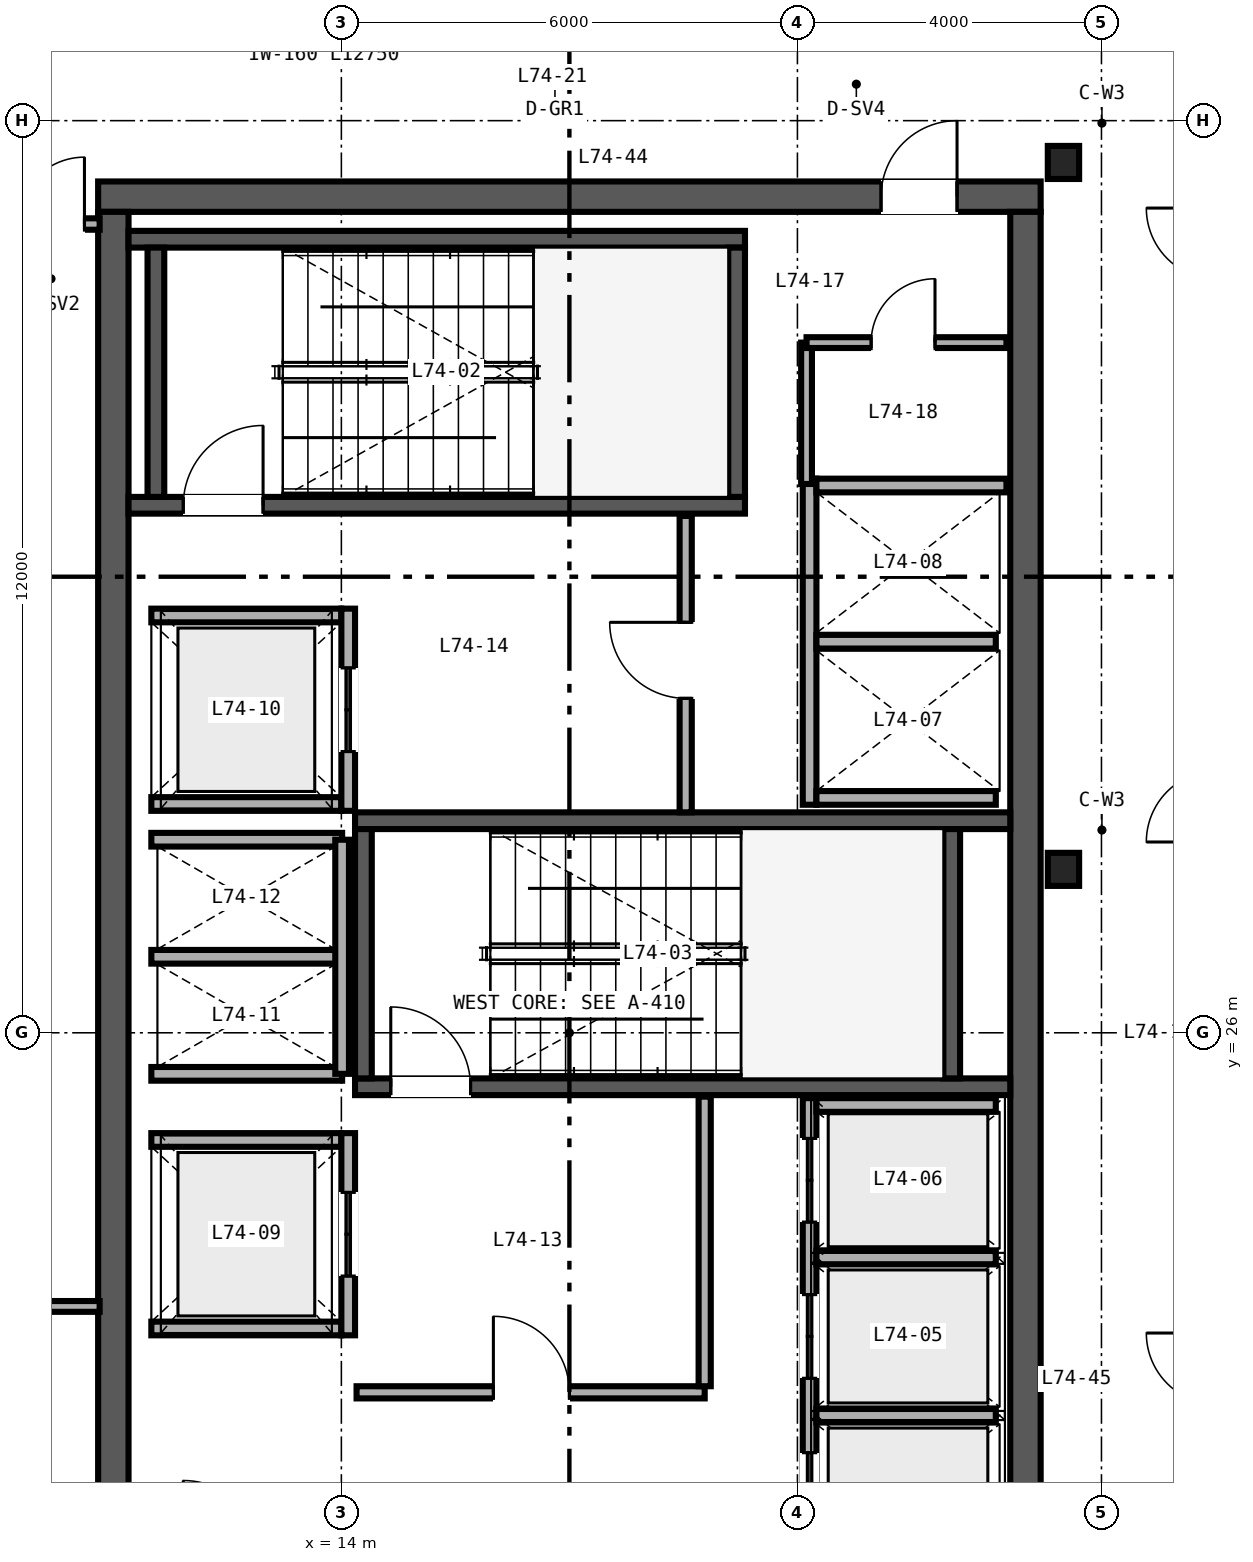
"""IFC4 building model, lengths in metres.
Left out: names, types, materials, properties, quantities, classifications, styles, units other than length and angle.
Written with IfcOpenShell. Run it as: python <this file> out.ifc"""

import sys

from ifc_helpers import new_model, si_unit, direction, frame, frame_2d, origin, origin_2d, place, context, subcontext, project, spatial, rectangle, i_section, extrude, source, transform, mapped, element, fill, save


model = new_model("IFC4")
c1 = context("Model", 3, precision=1e-05, world=origin(), true_north=direction((0.0, 1.0)))
c2 = subcontext(c1, "Body", "Model", "MODEL_VIEW")
j1 = project(units=[si_unit("LENGTHUNIT", "METRE"), si_unit("PLANEANGLEUNIT", "RADIAN")], contexts=[c1])
p1 = place(None, origin())
s1 = spatial("IfcSite", under=j1, at=p1, CompositionType="ELEMENT")
p2 = place(p1, origin())
s2 = spatial("IfcBuilding", under=s1, at=p2, CompositionType="ELEMENT")
p3 = place(p2, frame((0.0, 0.0, 290.4)))
s3 = spatial("IfcBuildingStorey", under=s2, at=p3, CompositionType="ELEMENT", Elevation=290.4)
p4 = place(p3, frame((10.8, 37.0, 0.0), z_axis=(0.0, 0.0, 1.0), x_axis=(1.0, 0.0, 0.0)))
e1 = element("IfcWall", 1, at=p4, inside=s3, PredefinedType="SHEAR", context=c2, shape_type="SweptSolid", body=[
    extrude(rectangle(XDim=12.4, YDim=0.4, at=frame_2d((6.2, 0.0))), origin(), (0.0, 0.0, 1.0), 3.38),
])
p5 = place(p4, frame((10.3, 0.0, 0.0)))
e2 = element("IfcOpeningElement", 2, at=p5, cuts=e1, PredefinedType="OPENING", context=c2, shape_type="SweptSolid", body=[
    extrude(rectangle(XDim=1.0, YDim=2.15, at=frame_2d((0.5, 1.075))), frame((0.0, 0.21, 0.0), z_axis=(0.0, -1.0, 0.0), x_axis=(1.0, 0.0, 0.0)), (0.0, 0.0, 1.0), 0.42),
])
for number, where, z_axis, x_axis in (
    (3, (11.0, 15.2, 0.0), (0.0, 0.0, 1.0), (0.0, 1.0, 0.0)),
    (4, (23.0, 15.2, 0.0), (0.0, 0.0, 1.0), (0.0, 1.0, 0.0)),
):
    element("IfcWall", number, at=place(p3, frame(where, z_axis=z_axis, x_axis=x_axis)), inside=s3, PredefinedType="SHEAR", context=c2, shape_type="SweptSolid", body=[
        extrude(rectangle(XDim=21.6, YDim=0.4, at=frame_2d((10.8, 0.0))), origin(), (0.0, 0.0, 1.0), 3.38),
    ])
p6 = place(p3, frame((11.2, 32.94, 0.0), z_axis=(0.0, 0.0, 1.0), x_axis=(1.0, 0.0, 0.0)))
e5 = element("IfcWall", 5, at=p6, inside=s3, PredefinedType="SHEAR", context=c2, shape_type="SweptSolid", body=[
    extrude(rectangle(XDim=8.11, YDim=0.22, at=frame_2d((4.055, 0.0))), origin(), (0.0, 0.0, 1.0), 3.4),
])
p7 = place(p6, frame((0.72, 0.0, 0.0)))
e6 = element("IfcOpeningElement", 6, at=p7, cuts=e5, PredefinedType="OPENING", context=c2, shape_type="SweptSolid", body=[
    extrude(rectangle(XDim=1.05, YDim=2.15, at=frame_2d((0.525, 1.075))), frame((0.0, 0.12, 0.0), z_axis=(0.0, -1.0, 0.0), x_axis=(1.0, 0.0, 0.0)), (0.0, 0.0, 1.0), 0.24),
])
p8 = place(p3, frame((11.2, 36.44, 0.0), z_axis=(0.0, 0.0, 1.0), x_axis=(1.0, 0.0, 0.0)))
e7 = element("IfcWall", 7, at=p8, inside=s3, PredefinedType="SHEAR", context=c2, shape_type="SweptSolid", body=[
    extrude(rectangle(XDim=8.11, YDim=0.22, at=frame_2d((4.055, 0.0))), origin(), (0.0, 0.0, 1.0), 3.4),
])
for number, where, z_axis, x_axis in (
    (8, (11.56, 33.05, 0.0), (0.0, 0.0, 1.0), (0.0, 1.0, 0.0)),
    (9, (19.2, 33.05, 0.0), (0.0, 0.0, 1.0), (0.0, 1.0, 0.0)),
):
    element("IfcWall", number, at=place(p3, frame(where, z_axis=z_axis, x_axis=x_axis)), inside=s3, PredefinedType="SHEAR", context=c2, shape_type="SweptSolid", body=[
        extrude(rectangle(XDim=3.28, YDim=0.22, at=frame_2d((1.64, 0.0))), origin(), (0.0, 0.0, 1.0), 3.4),
    ])
p9 = place(p3, frame((14.18, 25.29, 0.0), z_axis=(0.0, 0.0, 1.0), x_axis=(1.0, 0.0, 0.0)))
e10 = element("IfcWall", 10, at=p9, inside=s3, PredefinedType="SHEAR", context=c2, shape_type="SweptSolid", body=[
    extrude(rectangle(XDim=8.62, YDim=0.22, at=frame_2d((4.31, 0.0))), origin(), (0.0, 0.0, 1.0), 3.4),
])
p10 = place(p9, frame((0.47, 0.0, 0.0)))
e11 = element("IfcOpeningElement", 11, at=p10, cuts=e10, PredefinedType="OPENING", context=c2, shape_type="SweptSolid", body=[
    extrude(rectangle(XDim=1.05, YDim=2.15, at=frame_2d((0.525, 1.075))), frame((0.0, 0.12, 0.0), z_axis=(0.0, -1.0, 0.0), x_axis=(1.0, 0.0, 0.0)), (0.0, 0.0, 1.0), 0.24),
])
p11 = place(p3, frame((14.18, 28.79, 0.0), z_axis=(0.0, 0.0, 1.0), x_axis=(1.0, 0.0, 0.0)))
e12 = element("IfcWall", 12, at=p11, inside=s3, PredefinedType="SHEAR", context=c2, shape_type="SweptSolid", body=[
    extrude(rectangle(XDim=8.62, YDim=0.22, at=frame_2d((4.31, 0.0))), origin(), (0.0, 0.0, 1.0), 3.4),
])
for number, where, z_axis, x_axis in (
    (13, (14.29, 25.4, 0.0), (0.0, 0.0, 1.0), (0.0, 1.0, 0.0)),
    (14, (22.03, 25.4, 0.0), (0.0, 0.0, 1.0), (0.0, 1.0, 0.0)),
):
    element("IfcWall", number, at=place(p3, frame(where, z_axis=z_axis, x_axis=x_axis)), inside=s3, PredefinedType="SHEAR", context=c2, shape_type="SweptSolid", body=[
        extrude(rectangle(XDim=3.28, YDim=0.22, at=frame_2d((1.64, 0.0))), origin(), (0.0, 0.0, 1.0), 3.4),
    ])
m1 = source(origin(), c2, "Body", "SweptSolid", [
    extrude(i_section(OverallWidth=0.412, OverallDepth=0.435, WebThickness=0.036, FlangeThickness=0.057, FilletRadius=0.025, at=origin_2d()), origin(), (0.0, 0.0, 1.0), 3.38),
])
for number, where, z_axis, x_axis in (
    (15, (23.5, 28.15, 0.0), (0.0, 0.0, 1.0), (1.0, 0.0, 0.0)),
    (16, (23.5, 37.45, 0.0), (0.0, 0.0, 1.0), (1.0, 0.0, 0.0)),
):
    element("IfcColumn", number, at=place(p3, frame(where, z_axis=z_axis, x_axis=x_axis)), inside=s3, PredefinedType="COLUMN", context=c2, shape_type="MappedRepresentation", body=[
        mapped(m1, transform((0.0, 0.0, 0.0), scale=1.0)),
    ])
p12 = place(p3, frame((20.16, 18.82, 0.0), z_axis=(0.0, 0.0, 1.0), x_axis=(0.0, 1.0, 0.0)))
e17 = element("IfcWall", 17, at=p12, inside=s3, PredefinedType="SOLIDWALL", context=c2, shape_type="SweptSolid", body=[
    extrude(rectangle(XDim=6.32, YDim=0.18, at=frame_2d((3.16, 0.0))), origin(), (0.0, 0.0, 1.0), 2.48),
])
p13 = place(p12, frame((0.555, 0.0, 0.0)))
e18 = element("IfcOpeningElement", 18, at=p13, cuts=e17, PredefinedType="OPENING", context=c2, shape_type="SweptSolid", body=[
    extrude(rectangle(XDim=1.1, YDim=2.2, at=frame_2d((0.55, 1.1))), frame((0.0, 0.1, 0.0), z_axis=(0.0, -1.0, 0.0), x_axis=(1.0, 0.0, 0.0)), (0.0, 0.0, 1.0), 0.2),
])
p14 = place(p12, frame((2.635, 0.0, 0.0)))
e19 = element("IfcOpeningElement", 19, at=p14, cuts=e17, PredefinedType="OPENING", context=c2, shape_type="SweptSolid", body=[
    extrude(rectangle(XDim=1.1, YDim=2.2, at=frame_2d((0.55, 1.1))), frame((0.0, 0.1, 0.0), z_axis=(0.0, -1.0, 0.0), x_axis=(1.0, 0.0, 0.0)), (0.0, 0.0, 1.0), 0.2),
])
p15 = place(p12, frame((4.69, 0.0, 0.0)))
e20 = element("IfcOpeningElement", 20, at=p15, cuts=e17, PredefinedType="OPENING", context=c2, shape_type="SweptSolid", body=[
    extrude(rectangle(XDim=1.1, YDim=2.2, at=frame_2d((0.55, 1.1))), frame((0.0, 0.1, 0.0), z_axis=(0.0, -1.0, 0.0), x_axis=(1.0, 0.0, 0.0)), (0.0, 0.0, 1.0), 0.2),
])
p16 = place(p3, frame((20.25, 25.05, 0.0), z_axis=(0.0, 0.0, 1.0), x_axis=(1.0, 0.0, 0.0)))
e21 = element("IfcWall", 21, at=p16, inside=s3, PredefinedType="SOLIDWALL", context=c2, shape_type="SweptSolid", body=[
    extrude(rectangle(XDim=2.36, YDim=0.18, at=frame_2d((1.18, 0.0))), origin(), (0.0, 0.0, 1.0), 3.38),
])
p17 = place(p3, frame((20.25, 20.965, 0.0), z_axis=(0.0, 0.0, 1.0), x_axis=(1.0, 0.0, 0.0)))
e22 = element("IfcWall", 22, at=p17, inside=s3, PredefinedType="SOLIDWALL", context=c2, shape_type="SweptSolid", body=[
    extrude(rectangle(XDim=2.36, YDim=0.18, at=frame_2d((1.18, 0.0))), origin(), (0.0, 0.0, 1.0), 2.48),
])
p18 = place(p3, frame((20.25, 23.045, 0.0), z_axis=(0.0, 0.0, 1.0), x_axis=(1.0, 0.0, 0.0)))
e23 = element("IfcWall", 23, at=p18, inside=s3, PredefinedType="SOLIDWALL", context=c2, shape_type="SweptSolid", body=[
    extrude(rectangle(XDim=2.36, YDim=0.18, at=frame_2d((1.18, 0.0))), origin(), (0.0, 0.0, 1.0), 3.38),
])
p19 = place(p3, frame((20.16, 29.0, 0.0), z_axis=(0.0, 0.0, 1.0), x_axis=(0.0, 1.0, 0.0)))
e24 = element("IfcWall", 24, at=p19, inside=s3, PredefinedType="SOLIDWALL", context=c2, shape_type="SweptSolid", body=[
    extrude(rectangle(XDim=4.29, YDim=0.18, at=frame_2d((2.145, 0.0))), origin(), (0.0, 0.0, 1.0), 3.38),
])
p20 = place(p3, frame((20.25, 29.09, 0.0), z_axis=(0.0, 0.0, 1.0), x_axis=(1.0, 0.0, 0.0)))
e25 = element("IfcWall", 25, at=p20, inside=s3, PredefinedType="SOLIDWALL", context=c2, shape_type="SweptSolid", body=[
    extrude(rectangle(XDim=2.36, YDim=0.18, at=frame_2d((1.18, 0.0))), origin(), (0.0, 0.0, 1.0), 3.38),
])
p21 = place(p3, frame((20.25, 33.2, 0.0), z_axis=(0.0, 0.0, 1.0), x_axis=(1.0, 0.0, 0.0)))
e26 = element("IfcWall", 26, at=p21, inside=s3, PredefinedType="SOLIDWALL", context=c2, shape_type="SweptSolid", body=[
    extrude(rectangle(XDim=2.5, YDim=0.18, at=frame_2d((1.25, 0.0))), origin(), (0.0, 0.0, 1.0), 3.38),
])
p22 = place(p3, frame((20.25, 31.145, 0.0), z_axis=(0.0, 0.0, 1.0), x_axis=(1.0, 0.0, 0.0)))
e27 = element("IfcWall", 27, at=p22, inside=s3, PredefinedType="SOLIDWALL", context=c2, shape_type="SweptSolid", body=[
    extrude(rectangle(XDim=2.36, YDim=0.18, at=frame_2d((1.18, 0.0))), origin(), (0.0, 0.0, 1.0), 3.38),
])
for number, where, z_axis, x_axis in (
    (28, (11.5, 22.11, 0.0), (0.0, 0.0, 1.0), (1.0, 0.0, 0.0)),
    (29, (11.5, 24.59, 0.0), (0.0, 0.0, 1.0), (1.0, 0.0, 0.0)),
):
    element("IfcWall", number, at=place(p3, frame(where, z_axis=z_axis, x_axis=x_axis)), inside=s3, PredefinedType="SOLIDWALL", context=c2, shape_type="SweptSolid", body=[
        extrude(rectangle(XDim=2.5, YDim=0.18, at=frame_2d((1.25, 0.0))), origin(), (0.0, 0.0, 1.0), 3.38),
    ])
p23 = place(p3, frame((14.09, 22.02, 0.0), z_axis=(0.0, 0.0, 1.0), x_axis=(0.0, 1.0, 0.0)))
e30 = element("IfcWall", 30, at=p23, inside=s3, PredefinedType="SOLIDWALL", context=c2, shape_type="SweptSolid", body=[
    extrude(rectangle(XDim=2.66, YDim=0.18, at=frame_2d((1.33, 0.0))), origin(), (0.0, 0.0, 1.0), 3.38),
])
p24 = place(p23, frame((0.78, 0.0, 0.0)))
e31 = element("IfcOpeningElement", 31, at=p24, cuts=e30, PredefinedType="OPENING", context=c2, shape_type="SweptSolid", body=[
    extrude(rectangle(XDim=1.1, YDim=2.2, at=frame_2d((0.55, 1.1))), frame((0.0, 0.1, 0.0), z_axis=(0.0, -1.0, 0.0), x_axis=(1.0, 0.0, 0.0)), (0.0, 0.0, 1.0), 0.2),
])
for number, where, z_axis, x_axis in (
    (32, (11.5, 29.01, 0.0), (0.0, 0.0, 1.0), (1.0, 0.0, 0.0)),
    (33, (11.5, 31.49, 0.0), (0.0, 0.0, 1.0), (1.0, 0.0, 0.0)),
):
    element("IfcWall", number, at=place(p3, frame(where, z_axis=z_axis, x_axis=x_axis)), inside=s3, PredefinedType="SOLIDWALL", context=c2, shape_type="SweptSolid", body=[
        extrude(rectangle(XDim=2.5, YDim=0.18, at=frame_2d((1.25, 0.0))), origin(), (0.0, 0.0, 1.0), 3.38),
    ])
p25 = place(p3, frame((14.09, 28.92, 0.0), z_axis=(0.0, 0.0, 1.0), x_axis=(0.0, 1.0, 0.0)))
e34 = element("IfcWall", 34, at=p25, inside=s3, PredefinedType="SOLIDWALL", context=c2, shape_type="SweptSolid", body=[
    extrude(rectangle(XDim=2.66, YDim=0.18, at=frame_2d((1.33, 0.0))), origin(), (0.0, 0.0, 1.0), 3.38),
])
p26 = place(p25, frame((0.78, 0.0, 0.0)))
e35 = element("IfcOpeningElement", 35, at=p26, cuts=e34, PredefinedType="OPENING", context=c2, shape_type="SweptSolid", body=[
    extrude(rectangle(XDim=1.1, YDim=2.2, at=frame_2d((0.55, 1.1))), frame((0.0, 0.1, 0.0), z_axis=(0.0, -1.0, 0.0), x_axis=(1.0, 0.0, 0.0)), (0.0, 0.0, 1.0), 0.2),
])
for number, where, z_axis, x_axis in (
    (36, (11.5, 25.46, 0.0), (0.0, 0.0, 1.0), (1.0, 0.0, 0.0)),
    (37, (11.5, 27.0, 0.0), (0.0, 0.0, 1.0), (1.0, 0.0, 0.0)),
    (38, (11.5, 28.54, 0.0), (0.0, 0.0, 1.0), (1.0, 0.0, 0.0)),
):
    element("IfcWall", number, at=place(p3, frame(where, z_axis=z_axis, x_axis=x_axis)), inside=s3, PredefinedType="SOLIDWALL", context=c2, shape_type="SweptSolid", body=[
        extrude(rectangle(XDim=2.51, YDim=0.18, at=frame_2d((1.255, 0.0))), origin(), (0.0, 0.0, 1.0), 3.38),
    ])
p27 = place(p3, frame((14.01, 25.46, 0.0), z_axis=(0.0, 0.0, 1.0), x_axis=(0.0, 1.0, 0.0)))
e39 = element("IfcWall", 39, at=p27, inside=s3, PredefinedType="SOLIDWALL", context=c2, shape_type="SweptSolid", body=[
    extrude(rectangle(XDim=3.08, YDim=0.18, at=frame_2d((1.54, 0.0))), origin(), (0.0, 0.0, 1.0), 3.38),
])
p28 = place(p3, frame((14.2, 21.27, 0.0), z_axis=(0.0, 0.0, 1.0), x_axis=(1.0, 0.0, 0.0)))
e40 = element("IfcWall", 40, at=p28, inside=s3, PredefinedType="PARTITIONING", context=c2, shape_type="SweptSolid", body=[
    extrude(rectangle(XDim=4.58, YDim=0.16, at=frame_2d((2.29, 0.0))), origin(), (0.0, 0.0, 1.0), 3.38),
])
p29 = place(p28, frame((1.8, 0.0, 0.0)))
e41 = element("IfcOpeningElement", 41, at=p29, cuts=e40, PredefinedType="OPENING", context=c2, shape_type="SweptSolid", body=[
    extrude(rectangle(XDim=1.0, YDim=2.15, at=frame_2d((0.5, 1.075))), frame((0.0, 0.09, 0.0), z_axis=(0.0, -1.0, 0.0), x_axis=(1.0, 0.0, 0.0)), (0.0, 0.0, 1.0), 0.18),
])
p30 = place(p3, frame((18.78, 21.35, 0.0), z_axis=(0.0, 0.0, 1.0), x_axis=(0.0, 1.0, 0.0)))
e42 = element("IfcWall", 42, at=p30, inside=s3, PredefinedType="PARTITIONING", context=c2, shape_type="SweptSolid", body=[
    extrude(rectangle(XDim=3.81, YDim=0.16, at=frame_2d((1.905, 0.0))), origin(), (0.0, 0.0, 1.0), 3.38),
])
p31 = place(p3, frame((18.53, 28.9, 0.0), z_axis=(0.0, 0.0, 1.0), x_axis=(0.0, 1.0, 0.0)))
e43 = element("IfcWall", 43, at=p31, inside=s3, PredefinedType="PARTITIONING", context=c2, shape_type="SweptSolid", body=[
    extrude(rectangle(XDim=3.9, YDim=0.16, at=frame_2d((1.95, 0.0))), origin(), (0.0, 0.0, 1.0), 3.38),
])
p32 = place(p31, frame((1.5, 0.0, 0.0)))
e44 = element("IfcOpeningElement", 44, at=p32, cuts=e43, PredefinedType="OPENING", context=c2, shape_type="SweptSolid", body=[
    extrude(rectangle(XDim=1.0, YDim=2.15, at=frame_2d((0.5, 1.075))), frame((0.0, 0.09, 0.0), z_axis=(0.0, -1.0, 0.0), x_axis=(1.0, 0.0, 0.0)), (0.0, 0.0, 1.0), 0.18),
])
p33 = place(p3, frame((20.12, 33.22, 0.0), z_axis=(0.0, 0.0, 1.0), x_axis=(0.0, 1.0, 0.0)))
e45 = element("IfcWall", 45, at=p33, inside=s3, PredefinedType="PARTITIONING", context=c2, shape_type="SweptSolid", body=[
    extrude(rectangle(XDim=1.86, YDim=0.142, at=frame_2d((0.93, 0.0))), origin(), (0.0, 0.0, 1.0), 3.38),
])
p34 = place(p3, frame((20.12, 35.08, 0.0), z_axis=(0.0, 0.0, 1.0), x_axis=(1.0, 0.0, 0.0)))
e46 = element("IfcWall", 46, at=p34, inside=s3, PredefinedType="PARTITIONING", context=c2, shape_type="SweptSolid", body=[
    extrude(rectangle(XDim=2.63, YDim=0.142, at=frame_2d((1.315, 0.0))), origin(), (0.0, 0.0, 1.0), 3.38),
])
p35 = place(p34, frame((0.85, 0.0, 0.0)))
e47 = element("IfcOpeningElement", 47, at=p35, cuts=e46, PredefinedType="OPENING", context=c2, shape_type="SweptSolid", body=[
    extrude(rectangle(XDim=0.84, YDim=2.1, at=frame_2d((0.42, 1.05))), frame((0.0, 0.081, 0.0), z_axis=(0.0, -1.0, 0.0), x_axis=(1.0, 0.0, 0.0)), (0.0, 0.0, 1.0), 0.162),
])
p36 = place(p3, frame((8.16, 36.64, 0.0), z_axis=(0.0, 0.0, 1.0), x_axis=(1.0, 0.0, 0.0)))
e48 = element("IfcWall", 48, at=p36, inside=s3, PredefinedType="PARTITIONING", context=c2, shape_type="SweptSolid", body=[
    extrude(rectangle(XDim=2.66, YDim=0.15, at=frame_2d((1.33, 0.0))), origin(), (0.0, 0.0, 1.0), 2.763),
])
p37 = place(p36, frame((1.58, 0.0, 0.0)))
e49 = element("IfcOpeningElement", 49, at=p37, cuts=e48, PredefinedType="OPENING", context=c2, shape_type="SweptSolid", body=[
    extrude(rectangle(XDim=0.88, YDim=2.15, at=frame_2d((0.44, 1.075))), frame((0.0, 0.085, 0.0), z_axis=(0.0, -1.0, 0.0), x_axis=(1.0, 0.0, 0.0)), (0.0, 0.0, 1.0), 0.17),
])
p38 = place(p3, frame((8.16, 22.4, 0.0), z_axis=(0.0, 0.0, 1.0), x_axis=(1.0, 0.0, 0.0)))
e50 = element("IfcWall", 50, at=p38, inside=s3, PredefinedType="PARTITIONING", context=c2, shape_type="SweptSolid", body=[
    extrude(rectangle(XDim=2.66, YDim=0.142, at=frame_2d((1.33, 0.0))), origin(), (0.0, 0.0, 1.0), 2.601),
])
m2 = source(origin(), c2, "Body", "SweptSolid", [
    extrude(rectangle(XDim=1.05, YDim=2.15, at=frame_2d((0.525, 1.075))), frame((0.0, 0.025, 0.0), z_axis=(0.0, -1.0, 0.0), x_axis=(1.0, 0.0, 0.0)), (0.0, 0.0, 1.0), 0.05),
])
p39 = place(p7, origin())
e51 = element("IfcDoor", 51, at=p39, inside=s3, OperationType="SINGLE_SWING_RIGHT", PredefinedType="DOOR", context=c2, shape_type="MappedRepresentation", body=[
    mapped(m2, transform((0.0, 0.0, 0.0), scale=1.0)),
])
fill(e6, e51)
p40 = place(p10, origin())
e52 = element("IfcDoor", 52, at=p40, inside=s3, OperationType="SINGLE_SWING_LEFT", PredefinedType="DOOR", context=c2, shape_type="MappedRepresentation", body=[
    mapped(m2, transform((0.0, 0.0, 0.0), scale=1.0)),
])
fill(e11, e52)
m3 = source(origin(), c2, "Body", "SweptSolid", [
    extrude(rectangle(XDim=1.1, YDim=2.2, at=frame_2d((0.55, 1.1))), frame((0.0, 0.025, 0.0), z_axis=(0.0, -1.0, 0.0), x_axis=(1.0, 0.0, 0.0)), (0.0, 0.0, 1.0), 0.05),
])
p41 = place(p13, origin())
e53 = element("IfcDoor", 53, at=p41, inside=s3, OperationType="DOUBLE_DOOR_SLIDING", PredefinedType="DOOR", context=c2, shape_type="MappedRepresentation", body=[
    mapped(m3, transform((0.0, 0.0, 0.0), scale=1.0)),
])
fill(e18, e53)
p42 = place(p14, origin())
e54 = element("IfcDoor", 54, at=p42, inside=s3, OperationType="DOUBLE_DOOR_SLIDING", PredefinedType="DOOR", context=c2, shape_type="MappedRepresentation", body=[
    mapped(m3, transform((0.0, 0.0, 0.0), scale=1.0)),
])
fill(e19, e54)
p43 = place(p15, origin())
e55 = element("IfcDoor", 55, at=p43, inside=s3, OperationType="DOUBLE_DOOR_SLIDING", PredefinedType="DOOR", context=c2, shape_type="MappedRepresentation", body=[
    mapped(m3, transform((0.0, 0.0, 0.0), scale=1.0)),
])
fill(e20, e55)
p44 = place(p24, origin())
e56 = element("IfcDoor", 56, at=p44, inside=s3, OperationType="DOUBLE_DOOR_SLIDING", PredefinedType="DOOR", context=c2, shape_type="MappedRepresentation", body=[
    mapped(m3, transform((0.0, 0.0, 0.0), scale=1.0)),
])
fill(e31, e56)
p45 = place(p26, origin())
e57 = element("IfcDoor", 57, at=p45, inside=s3, OperationType="DOUBLE_DOOR_SLIDING", PredefinedType="DOOR", context=c2, shape_type="MappedRepresentation", body=[
    mapped(m3, transform((0.0, 0.0, 0.0), scale=1.0)),
])
fill(e35, e57)
m4 = source(origin(), c2, "Body", "SweptSolid", [
    extrude(rectangle(XDim=1.0, YDim=2.15, at=frame_2d((0.5, 1.075))), frame((0.0, 0.025, 0.0), z_axis=(0.0, -1.0, 0.0), x_axis=(1.0, 0.0, 0.0)), (0.0, 0.0, 1.0), 0.05),
])
p46 = place(p29, origin())
e58 = element("IfcDoor", 58, at=p46, inside=s3, OperationType="SINGLE_SWING_LEFT", PredefinedType="DOOR", context=c2, shape_type="MappedRepresentation", body=[
    mapped(m4, transform((0.0, 0.0, 0.0), scale=1.0)),
])
fill(e41, e58)
p47 = place(p32, origin())
e59 = element("IfcDoor", 59, at=p47, inside=s3, OperationType="SINGLE_SWING_RIGHT", PredefinedType="DOOR", context=c2, shape_type="MappedRepresentation", body=[
    mapped(m4, transform((0.0, 0.0, 0.0), scale=1.0)),
])
fill(e44, e59)
m5 = source(origin(), c2, "Body", "SweptSolid", [
    extrude(rectangle(XDim=0.84, YDim=2.1, at=frame_2d((0.42, 1.05))), frame((0.0, 0.025, 0.0), z_axis=(0.0, -1.0, 0.0), x_axis=(1.0, 0.0, 0.0)), (0.0, 0.0, 1.0), 0.05),
])
p48 = place(p35, origin())
e60 = element("IfcDoor", 60, at=p48, inside=s3, OperationType="SINGLE_SWING_RIGHT", PredefinedType="DOOR", context=c2, shape_type="MappedRepresentation", body=[
    mapped(m5, transform((0.0, 0.0, 0.0), scale=1.0)),
])
fill(e47, e60)
p49 = place(p5, origin())
e61 = element("IfcDoor", 61, at=p49, inside=s3, OperationType="SINGLE_SWING_RIGHT", PredefinedType="DOOR", context=c2, shape_type="MappedRepresentation", body=[
    mapped(m4, transform((0.0, 0.0, 0.0), scale=1.0)),
])
fill(e2, e61)
m6 = source(origin(), c2, "Body", "SweptSolid", [
    extrude(rectangle(XDim=0.88, YDim=2.15, at=frame_2d((0.44, 1.075))), frame((0.0, 0.025, 0.0), z_axis=(0.0, -1.0, 0.0), x_axis=(1.0, 0.0, 0.0)), (0.0, 0.0, 1.0), 0.05),
])
p50 = place(p37, origin())
e62 = element("IfcDoor", 62, at=p50, inside=s3, OperationType="SINGLE_SWING_RIGHT", PredefinedType="DOOR", context=c2, shape_type="MappedRepresentation", body=[
    mapped(m6, transform((0.0, 0.0, 0.0), scale=1.0)),
])
fill(e49, e62)
save(model, sys.argv[1])
